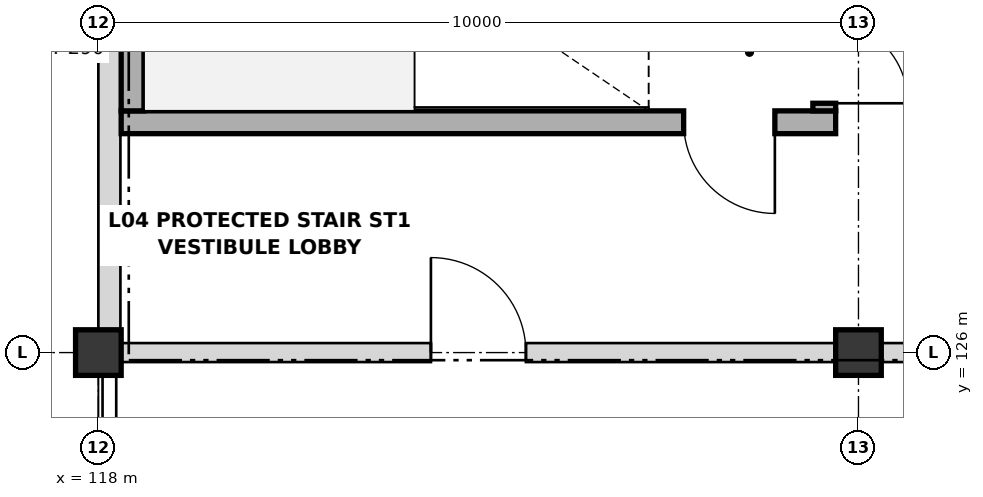
"""IFC4 building model, lengths in metres.
Left out: names, types, materials, properties, quantities, classifications, styles, units other than length and angle.
Written with IfcOpenShell. Run it as: python <this file> out.ifc"""

import sys

from ifc_helpers import new_model, si_unit, direction, frame, frame_2d, origin, origin_2d, place, context, subcontext, project, spatial, rectangle, extrude, element, fill, save


model = new_model("IFC4")
c1 = context("Model", 3, precision=1e-05, world=origin(), true_north=direction((0.0, 1.0)))
c2 = subcontext(c1, "Body", "Model", "MODEL_VIEW")
j1 = project(units=[si_unit("LENGTHUNIT", "METRE"), si_unit("PLANEANGLEUNIT", "RADIAN")], contexts=[c1])
p1 = place(None, origin())
s1 = spatial("IfcSite", under=j1, at=p1, CompositionType="ELEMENT")
p2 = place(p1, origin())
s2 = spatial("IfcBuilding", under=s1, at=p2, CompositionType="ELEMENT")
p3 = place(p2, frame((0.0, 0.0, 18.6)))
s3 = spatial("IfcBuildingStorey", under=s2, at=p3, CompositionType="ELEMENT", Elevation=18.6)
for number, where, z_axis, x_axis in (
    (1, (118.0, 126.0, 0.0), (0.0, 0.0, 1.0), (1.0, 0.0, 0.0)),
    (2, (128.0, 126.0, 0.0), (0.0, 0.0, 1.0), (1.0, 0.0, 0.0)),
):
    element("IfcColumn", number, at=place(p3, frame(where, z_axis=z_axis, x_axis=x_axis)), inside=s3, PredefinedType="COLUMN", context=c2, shape_type="SweptSolid", body=[
        extrude(rectangle(XDim=0.6, YDim=0.6, at=origin_2d()), origin(), (0.0, 0.0, 1.0), 4.2),
    ])
p4 = place(p3, frame((118.145, 126.295, 0.0), z_axis=(0.0, 0.0, 1.0), x_axis=(0.0, 1.0, 0.0)))
e3 = element("IfcWall", 3, at=p4, inside=s3, PredefinedType="SOLIDWALL", context=c2, shape_type="SweptSolid", body=[
    extrude(rectangle(XDim=7.41, YDim=0.29, at=frame_2d((3.705, 0.0))), origin(), (0.0, 0.0, 1.0), 3.188),
])
p5 = place(p3, frame((127.7, 129.03, 0.0), z_axis=(0.0, 0.0, 1.0), x_axis=(-1.0, 0.0, 0.0)))
e4 = element("IfcWall", 4, at=p5, inside=s3, PredefinedType="SHEAR", context=c2, shape_type="SweptSolid", body=[
    extrude(rectangle(XDim=9.4, YDim=0.3, at=frame_2d((4.7, 0.0))), origin(), (0.0, 0.0, 1.0), 4.2),
])
p6 = place(p5, frame((0.8, 0.0, 0.0)))
e5 = element("IfcOpeningElement", 5, at=p6, cuts=e4, PredefinedType="OPENING", context=c2, shape_type="SweptSolid", body=[
    extrude(rectangle(XDim=1.2, YDim=2.15, at=frame_2d((0.6, 1.075))), frame((0.0, 0.16, 0.0), z_axis=(0.0, -1.0, 0.0), x_axis=(1.0, 0.0, 0.0)), (0.0, 0.0, 1.0), 0.32),
])
p7 = place(p3, frame((127.55, 133.68, 0.0), z_axis=(0.0, 0.0, 1.0), x_axis=(0.0, -1.0, 0.0)))
e6 = element("IfcWall", 6, at=p7, inside=s3, PredefinedType="SHEAR", context=c2, shape_type="SweptSolid", body=[
    extrude(rectangle(XDim=4.5, YDim=0.3, at=frame_2d((2.25, 0.0))), origin(), (0.0, 0.0, 1.0), 4.2),
])
p8 = place(p7, frame((3.3, 0.0, 0.0)))
e7 = element("IfcOpeningElement", 7, at=p8, cuts=e6, PredefinedType="OPENING", context=c2, shape_type="SweptSolid", body=[
    extrude(rectangle(XDim=1.1, YDim=2.15, at=frame_2d((0.55, 1.075))), frame((0.0, 0.16, 0.0), z_axis=(0.0, -1.0, 0.0), x_axis=(1.0, 0.0, 0.0)), (0.0, 0.0, 1.0), 0.32),
])
p9 = place(p3, frame((118.45, 129.18, 0.0), z_axis=(0.0, 0.0, 1.0), x_axis=(0.0, 1.0, 0.0)))
e8 = element("IfcWall", 8, at=p9, inside=s3, PredefinedType="SHEAR", context=c2, shape_type="SweptSolid", body=[
    extrude(rectangle(XDim=4.5, YDim=0.3, at=frame_2d((2.25, 0.0))), origin(), (0.0, 0.0, 1.0), 4.2),
])
p10 = place(p3, frame((118.305, 126.0, 0.0), z_axis=(0.0, 0.0, 1.0), x_axis=(1.0, 0.0, 0.0)))
e9 = element("IfcWall", 9, at=p10, inside=s3, PredefinedType="PARTITIONING", context=c2, shape_type="SweptSolid", body=[
    extrude(rectangle(XDim=9.39, YDim=0.25, at=frame_2d((4.695, 0.0))), origin(), (0.0, 0.0, 1.0), 3.188),
])
p11 = place(p10, frame((4.07, 0.0, 0.0)))
e10 = element("IfcOpeningElement", 10, at=p11, cuts=e9, PredefinedType="OPENING", context=c2, shape_type="SweptSolid", body=[
    extrude(rectangle(XDim=1.25, YDim=2.15, at=frame_2d((0.625, 1.075))), frame((0.0, 0.135, 0.0), z_axis=(0.0, -1.0, 0.0), x_axis=(1.0, 0.0, 0.0)), (0.0, 0.0, 1.0), 0.27),
])
p12 = place(p3, frame((128.305, 126.0, 0.0), z_axis=(0.0, 0.0, 1.0), x_axis=(1.0, 0.0, 0.0)))
e11 = element("IfcWall", 11, at=p12, inside=s3, PredefinedType="PARTITIONING", context=c2, shape_type="SweptSolid", body=[
    extrude(rectangle(XDim=9.39, YDim=0.25, at=frame_2d((4.695, 0.0))), origin(), (0.0, 0.0, 1.0), 3.188),
])
p13 = place(p12, frame((1.87, 0.0, 0.0)))
e12 = element("IfcOpeningElement", 12, at=p13, cuts=e11, PredefinedType="OPENING", context=c2, shape_type="SweptSolid", body=[
    extrude(rectangle(XDim=1.25, YDim=2.15, at=frame_2d((0.625, 1.075))), frame((0.0, 0.135, 0.0), z_axis=(0.0, -1.0, 0.0), x_axis=(1.0, 0.0, 0.0)), (0.0, 0.0, 1.0), 0.27),
])
p14 = place(p12, frame((6.345, 0.0, 0.0)))
e13 = element("IfcOpeningElement", 13, at=p14, cuts=e11, PredefinedType="OPENING", context=c2, shape_type="SweptSolid", body=[
    extrude(rectangle(XDim=1.1, YDim=2.15, at=frame_2d((0.55, 1.075))), frame((0.0, 0.135, 0.0), z_axis=(0.0, -1.0, 0.0), x_axis=(1.0, 0.0, 0.0)), (0.0, 0.0, 1.0), 0.27),
])
p15 = place(p6, origin())
e14 = element("IfcDoor", 14, at=p15, inside=s3, OperationType="SINGLE_SWING_LEFT", PredefinedType="DOOR", context=c2, shape_type="SweptSolid", body=[
    extrude(rectangle(XDim=1.2, YDim=2.15, at=frame_2d((0.6, 1.075))), frame((0.0, 0.025, 0.0), z_axis=(0.0, -1.0, 0.0), x_axis=(1.0, 0.0, 0.0)), (0.0, 0.0, 1.0), 0.05),
])
fill(e5, e14)
p16 = place(p8, origin())
e15 = element("IfcDoor", 15, at=p16, inside=s3, OperationType="SINGLE_SWING_RIGHT", PredefinedType="DOOR", context=c2, shape_type="SweptSolid", body=[
    extrude(rectangle(XDim=1.1, YDim=2.15, at=frame_2d((0.55, 1.075))), frame((0.0, 0.025, 0.0), z_axis=(0.0, -1.0, 0.0), x_axis=(1.0, 0.0, 0.0)), (0.0, 0.0, 1.0), 0.05),
])
fill(e7, e15)
p17 = place(p11, origin())
e16 = element("IfcDoor", 16, at=p17, inside=s3, OperationType="SINGLE_SWING_LEFT", PredefinedType="DOOR", context=c2, shape_type="SweptSolid", body=[
    extrude(rectangle(XDim=1.25, YDim=2.15, at=frame_2d((0.625, 1.075))), frame((0.0, 0.025, 0.0), z_axis=(0.0, -1.0, 0.0), x_axis=(1.0, 0.0, 0.0)), (0.0, 0.0, 1.0), 0.05),
])
fill(e10, e16)
save(model, sys.argv[1])
